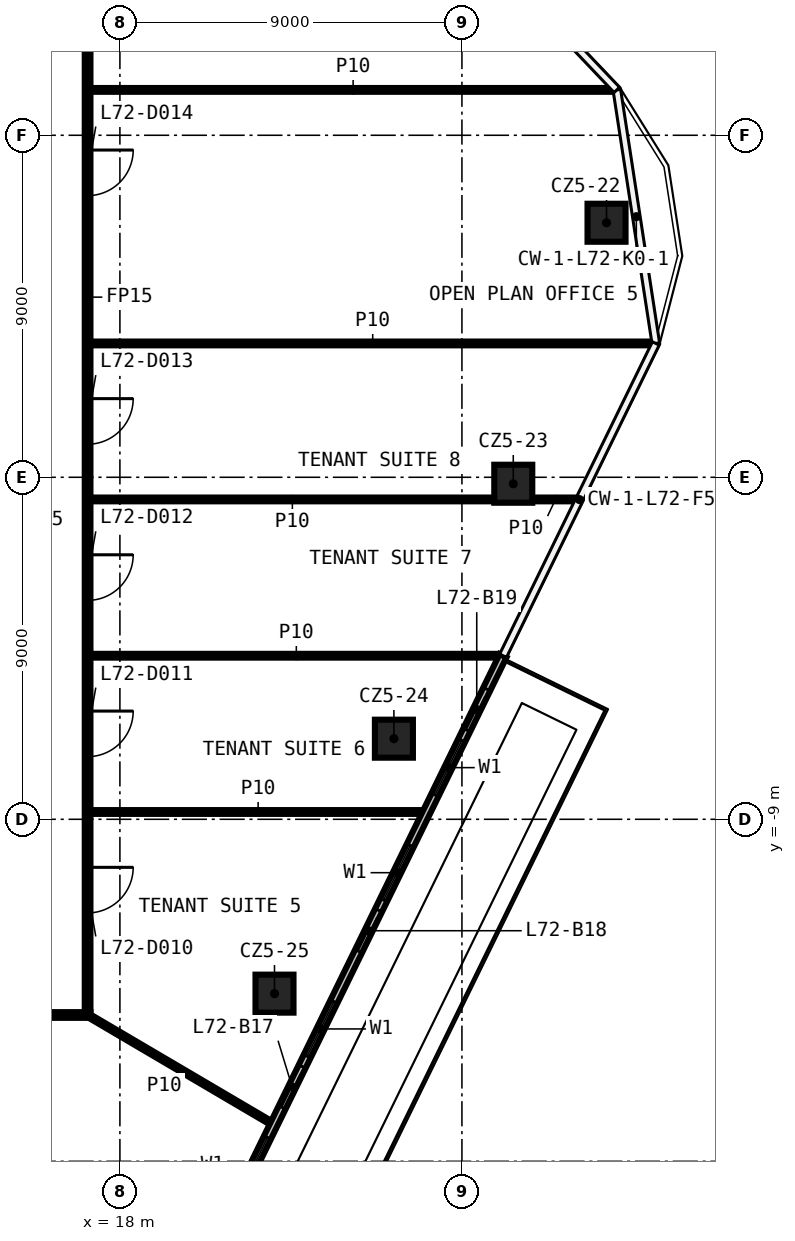
"""IFC4 building model, lengths in metres.
Left out: names, types, materials, properties, quantities, classifications, styles, units other than length and angle.
Written with IfcOpenShell. Run it as: python <this file> out.ifc"""

import sys

from ifc_helpers import new_model, si_unit, direction, frame, frame_2d, origin, origin_2d, place, context, subcontext, project, spatial, rectangle, extrude, element, fill, save


model = new_model("IFC4")
c1 = context("Model", 3, precision=1e-05, world=origin(), true_north=direction((0.0, 1.0)))
c2 = subcontext(c1, "Body", "Model", "MODEL_VIEW")
j1 = project(units=[si_unit("LENGTHUNIT", "METRE"), si_unit("PLANEANGLEUNIT", "RADIAN")], contexts=[c1])
p1 = place(None, origin())
s1 = spatial("IfcSite", under=j1, at=p1, CompositionType="ELEMENT")
p2 = place(p1, origin())
s2 = spatial("IfcBuilding", under=s1, at=p2, CompositionType="ELEMENT")
p3 = place(p2, frame((0.0, 0.0, 336.2)))
s3 = spatial("IfcBuildingStorey", under=s2, at=p3, CompositionType="ELEMENT", Elevation=336.2)
for number, where, z_axis, x_axis in (
    (1, (30.805, 6.698, 0.0), (0.0, 0.0, 1.0), (1.0, 0.0, 0.0)),
    (2, (28.351, -0.17, 0.0), (0.0, 0.0, 1.0), (1.0, 0.0, 0.0)),
    (3, (25.21, -6.879, 0.0), (0.0, 0.0, 1.0), (1.0, 0.0, 0.0)),
    (4, (22.068, -13.588, 0.0), (0.0, 0.0, 1.0), (1.0, 0.0, 0.0)),
):
    element("IfcColumn", number, at=place(p3, frame(where, z_axis=z_axis, x_axis=x_axis)), inside=s3, PredefinedType="COLUMN", context=c2, shape_type="SweptSolid", body=[
        extrude(rectangle(XDim=1.0, YDim=1.0, at=origin_2d()), origin(), (0.0, 0.0, 1.0), 3.82),
    ])
p4 = place(p3, frame((17.225, -14.15, 0.0), z_axis=(0.0, 0.0, 1.0), x_axis=(-1.0, 0.0, 0.0)))
e5 = element("IfcWall", 5, at=p4, inside=s3, PredefinedType="PARTITIONING", context=c2, shape_type="SweptSolid", body=[
    extrude(rectangle(XDim=34.45, YDim=0.15, at=frame_2d((17.225, 0.0))), origin(), (0.0, 0.0, 1.0), 3.82),
])
p5 = place(p4, frame((24.639, 0.0, 0.0)))
e6 = element("IfcOpeningElement", 6, at=p5, cuts=e5, PredefinedType="OPENING", context=c2, shape_type="SweptSolid", body=[
    extrude(rectangle(XDim=1.2, YDim=2.1, at=frame_2d((0.6, 1.05))), frame((0.0, 0.085, 0.0), z_axis=(0.0, -1.0, 0.0), x_axis=(1.0, 0.0, 0.0)), (0.0, 0.0, 1.0), 0.17),
])
p6 = place(p4, frame((20.005, 0.0, 0.0)))
e7 = element("IfcOpeningElement", 7, at=p6, cuts=e5, PredefinedType="OPENING", context=c2, shape_type="SweptSolid", body=[
    extrude(rectangle(XDim=1.2, YDim=2.1, at=frame_2d((0.6, 1.05))), frame((0.0, 0.085, 0.0), z_axis=(0.0, -1.0, 0.0), x_axis=(1.0, 0.0, 0.0)), (0.0, 0.0, 1.0), 0.17),
])
p7 = place(p4, frame((15.367, 0.0, 0.0)))
e8 = element("IfcOpeningElement", 8, at=p7, cuts=e5, PredefinedType="OPENING", context=c2, shape_type="SweptSolid", body=[
    extrude(rectangle(XDim=1.2, YDim=2.1, at=frame_2d((0.6, 1.05))), frame((0.0, 0.085, 0.0), z_axis=(0.0, -1.0, 0.0), x_axis=(1.0, 0.0, 0.0)), (0.0, 0.0, 1.0), 0.17),
])
p8 = place(p4, frame((10.73, 0.0, 0.0)))
e9 = element("IfcOpeningElement", 9, at=p8, cuts=e5, PredefinedType="OPENING", context=c2, shape_type="SweptSolid", body=[
    extrude(rectangle(XDim=1.2, YDim=2.1, at=frame_2d((0.6, 1.05))), frame((0.0, 0.085, 0.0), z_axis=(0.0, -1.0, 0.0), x_axis=(1.0, 0.0, 0.0)), (0.0, 0.0, 1.0), 0.17),
])
p9 = place(p4, frame((6.097, 0.0, 0.0)))
e10 = element("IfcOpeningElement", 10, at=p9, cuts=e5, PredefinedType="OPENING", context=c2, shape_type="SweptSolid", body=[
    extrude(rectangle(XDim=1.2, YDim=2.1, at=frame_2d((0.6, 1.05))), frame((0.0, 0.085, 0.0), z_axis=(0.0, -1.0, 0.0), x_axis=(1.0, 0.0, 0.0)), (0.0, 0.0, 1.0), 0.17),
])
p10 = place(p4, frame((1.83, 0.0, 0.0)))
e11 = element("IfcOpeningElement", 11, at=p10, cuts=e5, PredefinedType="OPENING", context=c2, shape_type="SweptSolid", body=[
    extrude(rectangle(XDim=1.2, YDim=2.1, at=frame_2d((0.6, 1.05))), frame((0.0, 0.085, 0.0), z_axis=(0.0, -1.0, 0.0), x_axis=(1.0, 0.0, 0.0)), (0.0, 0.0, 1.0), 0.17),
])
p11 = place(p3, frame((17.225, -8.808, 0.0), z_axis=(0.0, 0.0, 1.0), x_axis=(1.0, 0.0, 0.0)))
e12 = element("IfcWall", 12, at=p11, inside=s3, PredefinedType="PARTITIONING", context=c2, shape_type="SweptSolid", body=[
    extrude(rectangle(XDim=8.824, YDim=0.1, at=frame_2d((4.412, 0.0))), origin(), (0.0, 0.0, 1.0), 3.82),
])
p12 = place(p3, frame((17.225, -4.696, 0.0), z_axis=(0.0, 0.0, 1.0), x_axis=(1.0, 0.0, 0.0)))
e13 = element("IfcWall", 13, at=p12, inside=s3, PredefinedType="PARTITIONING", context=c2, shape_type="SweptSolid", body=[
    extrude(rectangle(XDim=10.835, YDim=0.1, at=frame_2d((5.417, 0.0))), origin(), (0.0, 0.0, 1.0), 3.82),
])
p13 = place(p3, frame((17.225, -0.583, 0.0), z_axis=(0.0, 0.0, 1.0), x_axis=(1.0, 0.0, 0.0)))
e14 = element("IfcWall", 14, at=p13, inside=s3, PredefinedType="PARTITIONING", context=c2, shape_type="SweptSolid", body=[
    extrude(rectangle(XDim=10.626, YDim=0.1, at=frame_2d((5.313, 0.0))), origin(), (0.0, 0.0, 1.0), 3.82),
])
p14 = place(p3, frame((28.851, -0.583, 0.0), z_axis=(0.0, 0.0, 1.0), x_axis=(1.0, 0.0, 0.0)))
e15 = element("IfcWall", 15, at=p14, inside=s3, PredefinedType="PARTITIONING", context=c2, shape_type="SweptSolid", body=[
    extrude(rectangle(XDim=1.221, YDim=0.1, at=frame_2d((0.611, 0.0))), origin(), (0.0, 0.0, 1.0), 3.82),
])
p15 = place(p3, frame((17.225, 3.522, 0.0), z_axis=(0.0, 0.0, 1.0), x_axis=(1.0, 0.0, 0.0)))
e16 = element("IfcWall", 16, at=p15, inside=s3, PredefinedType="PARTITIONING", context=c2, shape_type="SweptSolid", body=[
    extrude(rectangle(XDim=14.854, YDim=0.1, at=frame_2d((7.427, 0.0))), origin(), (0.0, 0.0, 1.0), 3.82),
])
p16 = place(p3, frame((17.225, 10.194, 0.0), z_axis=(0.0, 0.0, 1.0), x_axis=(1.0, 0.0, 0.0)))
e17 = element("IfcWall", 17, at=p16, inside=s3, PredefinedType="PARTITIONING", context=c2, shape_type="SweptSolid", body=[
    extrude(rectangle(XDim=13.823, YDim=0.1, at=frame_2d((6.912, 0.0))), origin(), (0.0, 0.0, 1.0), 3.82),
])
p17 = place(p3, frame((17.15, 14.075, 0.0), z_axis=(0.0, 0.0, 1.0), x_axis=(0.0, -1.0, 0.0)))
e18 = element("IfcWall", 18, at=p17, inside=s3, PredefinedType="PARTITIONING", context=c2, shape_type="SweptSolid", body=[
    extrude(rectangle(XDim=28.15, YDim=0.15, at=frame_2d((14.075, 0.0))), origin(), (0.0, 0.0, 1.0), 3.82),
])
p18 = place(p17, frame((24.339, 0.0, 0.0)))
e19 = element("IfcOpeningElement", 19, at=p18, cuts=e18, PredefinedType="OPENING", context=c2, shape_type="SweptSolid", body=[
    extrude(rectangle(XDim=1.2, YDim=2.1, at=frame_2d((0.6, 1.05))), frame((0.0, 0.085, 0.0), z_axis=(0.0, -1.0, 0.0), x_axis=(1.0, 0.0, 0.0)), (0.0, 0.0, 1.0), 0.17),
])
p19 = place(p17, frame((20.227, 0.0, 0.0)))
e20 = element("IfcOpeningElement", 20, at=p19, cuts=e18, PredefinedType="OPENING", context=c2, shape_type="SweptSolid", body=[
    extrude(rectangle(XDim=1.2, YDim=2.1, at=frame_2d((0.6, 1.05))), frame((0.0, 0.085, 0.0), z_axis=(0.0, -1.0, 0.0), x_axis=(1.0, 0.0, 0.0)), (0.0, 0.0, 1.0), 0.17),
])
p20 = place(p17, frame((16.115, 0.0, 0.0)))
e21 = element("IfcOpeningElement", 21, at=p20, cuts=e18, PredefinedType="OPENING", context=c2, shape_type="SweptSolid", body=[
    extrude(rectangle(XDim=1.2, YDim=2.1, at=frame_2d((0.6, 1.05))), frame((0.0, 0.085, 0.0), z_axis=(0.0, -1.0, 0.0), x_axis=(1.0, 0.0, 0.0)), (0.0, 0.0, 1.0), 0.17),
])
p21 = place(p17, frame((12.006, 0.0, 0.0)))
e22 = element("IfcOpeningElement", 22, at=p21, cuts=e18, PredefinedType="OPENING", context=c2, shape_type="SweptSolid", body=[
    extrude(rectangle(XDim=1.2, YDim=2.1, at=frame_2d((0.6, 1.05))), frame((0.0, 0.085, 0.0), z_axis=(0.0, -1.0, 0.0), x_axis=(1.0, 0.0, 0.0)), (0.0, 0.0, 1.0), 0.17),
])
p22 = place(p17, frame((5.464, 0.0, 0.0)))
e23 = element("IfcOpeningElement", 23, at=p22, cuts=e18, PredefinedType="OPENING", context=c2, shape_type="SweptSolid", body=[
    extrude(rectangle(XDim=1.2, YDim=2.1, at=frame_2d((0.6, 1.05))), frame((0.0, 0.085, 0.0), z_axis=(0.0, -1.0, 0.0), x_axis=(1.0, 0.0, 0.0)), (0.0, 0.0, 1.0), 0.17),
])
p23 = place(p17, frame((1.569, 0.0, 0.0)))
e24 = element("IfcOpeningElement", 24, at=p23, cuts=e18, PredefinedType="OPENING", context=c2, shape_type="SweptSolid", body=[
    extrude(rectangle(XDim=1.2, YDim=2.1, at=frame_2d((0.6, 1.05))), frame((0.0, 0.085, 0.0), z_axis=(0.0, -1.0, 0.0), x_axis=(1.0, 0.0, 0.0)), (0.0, 0.0, 1.0), 0.17),
])
p24 = place(p3, frame((17.15, -14.15, 0.0), z_axis=(0.0, 0.0, 1.0), x_axis=(0.861895432603, -0.507086051137, 0.0)))
e25 = element("IfcWall", 25, at=p24, inside=s3, PredefinedType="PARTITIONING", context=c2, shape_type="SweptSolid", body=[
    extrude(rectangle(XDim=5.664, YDim=0.1, at=frame_2d((2.832, 0.0))), origin(), (0.0, 0.0, 1.0), 3.82),
])
p25 = place(p3, frame((18.027, -25.256, 0.0), z_axis=(0.0, 0.0, 1.0), x_axis=(0.439336781314, 0.898322432418, 0.0)))
e26 = element("IfcWall", 26, at=p25, inside=s3, PredefinedType="SOLIDWALL", context=c2, shape_type="SweptSolid", body=[
    extrude(rectangle(XDim=22.887, YDim=0.2, at=frame_2d((11.444, 0.0))), origin(), (0.0, 0.0, 1.0), 3.82),
])
p26 = place(p25, frame((2.0, 0.0, 0.6)))
e27 = element("IfcOpeningElement", 27, at=p26, cuts=e26, PredefinedType="OPENING", context=c2, shape_type="SweptSolid", body=[
    extrude(rectangle(XDim=1.6, YDim=2.4, at=frame_2d((0.8, 1.2))), frame((0.0, 0.11, 0.0), z_axis=(0.0, -1.0, 0.0), x_axis=(1.0, 0.0, 0.0)), (0.0, 0.0, 1.0), 0.22),
])
p27 = place(p25, frame((0.5, 0.0, 0.0)))
e28 = element("IfcOpeningElement", 28, at=p27, cuts=e26, PredefinedType="OPENING", context=c2, shape_type="SweptSolid", body=[
    extrude(rectangle(XDim=1.2, YDim=2.4, at=frame_2d((0.6, 1.2))), frame((0.0, 0.11, 0.0), z_axis=(0.0, -1.0, 0.0), x_axis=(1.0, 0.0, 0.0)), (0.0, 0.0, 1.0), 0.22),
])
p28 = place(p25, frame((7.177, 0.0, 0.6)))
e29 = element("IfcOpeningElement", 29, at=p28, cuts=e26, PredefinedType="OPENING", context=c2, shape_type="SweptSolid", body=[
    extrude(rectangle(XDim=1.6, YDim=2.4, at=frame_2d((0.8, 1.2))), frame((0.0, 0.11, 0.0), z_axis=(0.0, -1.0, 0.0), x_axis=(1.0, 0.0, 0.0)), (0.0, 0.0, 1.0), 0.22),
])
p29 = place(p25, frame((5.677, 0.0, 0.0)))
e30 = element("IfcOpeningElement", 30, at=p29, cuts=e26, PredefinedType="OPENING", context=c2, shape_type="SweptSolid", body=[
    extrude(rectangle(XDim=1.2, YDim=2.4, at=frame_2d((0.6, 1.2))), frame((0.0, 0.11, 0.0), z_axis=(0.0, -1.0, 0.0), x_axis=(1.0, 0.0, 0.0)), (0.0, 0.0, 1.0), 0.22),
])
p30 = place(p25, frame((11.155, 0.0, 0.6)))
e31 = element("IfcOpeningElement", 31, at=p30, cuts=e26, PredefinedType="OPENING", context=c2, shape_type="SweptSolid", body=[
    extrude(rectangle(XDim=1.6, YDim=2.4, at=frame_2d((0.8, 1.2))), frame((0.0, 0.11, 0.0), z_axis=(0.0, -1.0, 0.0), x_axis=(1.0, 0.0, 0.0)), (0.0, 0.0, 1.0), 0.22),
])
p31 = place(p25, frame((9.655, 0.0, 0.0)))
e32 = element("IfcOpeningElement", 32, at=p31, cuts=e26, PredefinedType="OPENING", context=c2, shape_type="SweptSolid", body=[
    extrude(rectangle(XDim=1.2, YDim=2.4, at=frame_2d((0.6, 1.2))), frame((0.0, 0.11, 0.0), z_axis=(0.0, -1.0, 0.0), x_axis=(1.0, 0.0, 0.0)), (0.0, 0.0, 1.0), 0.22),
])
p32 = place(p25, frame((15.732, 0.0, 0.6)))
e33 = element("IfcOpeningElement", 33, at=p32, cuts=e26, PredefinedType="OPENING", context=c2, shape_type="SweptSolid", body=[
    extrude(rectangle(XDim=1.6, YDim=2.4, at=frame_2d((0.8, 1.2))), frame((0.0, 0.11, 0.0), z_axis=(0.0, -1.0, 0.0), x_axis=(1.0, 0.0, 0.0)), (0.0, 0.0, 1.0), 0.22),
])
p33 = place(p25, frame((14.232, 0.0, 0.0)))
e34 = element("IfcOpeningElement", 34, at=p33, cuts=e26, PredefinedType="OPENING", context=c2, shape_type="SweptSolid", body=[
    extrude(rectangle(XDim=1.2, YDim=2.4, at=frame_2d((0.6, 1.2))), frame((0.0, 0.11, 0.0), z_axis=(0.0, -1.0, 0.0), x_axis=(1.0, 0.0, 0.0)), (0.0, 0.0, 1.0), 0.22),
])
p34 = place(p25, frame((18.81, 0.0, 0.6)))
e35 = element("IfcOpeningElement", 35, at=p34, cuts=e26, PredefinedType="OPENING", context=c2, shape_type="SweptSolid", body=[
    extrude(rectangle(XDim=1.6, YDim=2.4, at=frame_2d((0.8, 1.2))), frame((0.0, 0.11, 0.0), z_axis=(0.0, -1.0, 0.0), x_axis=(1.0, 0.0, 0.0)), (0.0, 0.0, 1.0), 0.22),
])
p35 = place(p25, frame((20.71, 0.0, 0.0)))
e36 = element("IfcOpeningElement", 36, at=p35, cuts=e26, PredefinedType="OPENING", context=c2, shape_type="SweptSolid", body=[
    extrude(rectangle(XDim=1.2, YDim=2.4, at=frame_2d((0.6, 1.2))), frame((0.0, 0.11, 0.0), z_axis=(0.0, -1.0, 0.0), x_axis=(1.0, 0.0, 0.0)), (0.0, 0.0, 1.0), 0.22),
])
p36 = place(p18, origin())
e37 = element("IfcDoor", 37, at=p36, inside=s3, OperationType="SINGLE_SWING_LEFT", PredefinedType="DOOR", context=c2, shape_type="SweptSolid", body=[
    extrude(rectangle(XDim=1.2, YDim=2.1, at=frame_2d((0.6, 1.05))), frame((0.0, 0.025, 0.0), z_axis=(0.0, -1.0, 0.0), x_axis=(1.0, 0.0, 0.0)), (0.0, 0.0, 1.0), 0.05),
])
fill(e19, e37)
p37 = place(p19, origin())
e38 = element("IfcDoor", 38, at=p37, inside=s3, OperationType="SINGLE_SWING_RIGHT", PredefinedType="DOOR", context=c2, shape_type="SweptSolid", body=[
    extrude(rectangle(XDim=1.2, YDim=2.1, at=frame_2d((0.6, 1.05))), frame((0.0, 0.025, 0.0), z_axis=(0.0, -1.0, 0.0), x_axis=(1.0, 0.0, 0.0)), (0.0, 0.0, 1.0), 0.05),
])
fill(e20, e38)
p38 = place(p20, origin())
e39 = element("IfcDoor", 39, at=p38, inside=s3, OperationType="SINGLE_SWING_LEFT", PredefinedType="DOOR", context=c2, shape_type="SweptSolid", body=[
    extrude(rectangle(XDim=1.2, YDim=2.1, at=frame_2d((0.6, 1.05))), frame((0.0, 0.025, 0.0), z_axis=(0.0, -1.0, 0.0), x_axis=(1.0, 0.0, 0.0)), (0.0, 0.0, 1.0), 0.05),
])
fill(e21, e39)
p39 = place(p21, origin())
e40 = element("IfcDoor", 40, at=p39, inside=s3, OperationType="SINGLE_SWING_RIGHT", PredefinedType="DOOR", context=c2, shape_type="SweptSolid", body=[
    extrude(rectangle(XDim=1.2, YDim=2.1, at=frame_2d((0.6, 1.05))), frame((0.0, 0.025, 0.0), z_axis=(0.0, -1.0, 0.0), x_axis=(1.0, 0.0, 0.0)), (0.0, 0.0, 1.0), 0.05),
])
fill(e22, e40)
p40 = place(p22, origin())
e41 = element("IfcDoor", 41, at=p40, inside=s3, OperationType="SINGLE_SWING_LEFT", PredefinedType="DOOR", context=c2, shape_type="SweptSolid", body=[
    extrude(rectangle(XDim=1.2, YDim=2.1, at=frame_2d((0.6, 1.05))), frame((0.0, 0.025, 0.0), z_axis=(0.0, -1.0, 0.0), x_axis=(1.0, 0.0, 0.0)), (0.0, 0.0, 1.0), 0.05),
])
fill(e23, e41)
p41 = place(p28, origin())
e42 = element("IfcWindow", 42, at=p41, inside=s3, PartitioningType="SINGLE_PANEL", PredefinedType="WINDOW", context=c2, shape_type="SweptSolid", body=[
    extrude(rectangle(XDim=1.6, YDim=2.4, at=frame_2d((0.8, 1.2))), frame((0.0, 0.03, 0.0), z_axis=(0.0, -1.0, 0.0), x_axis=(1.0, 0.0, 0.0)), (0.0, 0.0, 1.0), 0.06),
])
fill(e29, e42)
p42 = place(p30, origin())
e43 = element("IfcWindow", 43, at=p42, inside=s3, PartitioningType="SINGLE_PANEL", PredefinedType="WINDOW", context=c2, shape_type="SweptSolid", body=[
    extrude(rectangle(XDim=1.6, YDim=2.4, at=frame_2d((0.8, 1.2))), frame((0.0, 0.03, 0.0), z_axis=(0.0, -1.0, 0.0), x_axis=(1.0, 0.0, 0.0)), (0.0, 0.0, 1.0), 0.06),
])
fill(e31, e43)
p43 = place(p31, origin())
e44 = element("IfcDoor", 44, at=p43, inside=s3, OperationType="SLIDING_TO_LEFT", PredefinedType="DOOR", context=c2, shape_type="SweptSolid", body=[
    extrude(rectangle(XDim=1.2, YDim=2.4, at=frame_2d((0.6, 1.2))), frame((0.0, 0.025, 0.0), z_axis=(0.0, -1.0, 0.0), x_axis=(1.0, 0.0, 0.0)), (0.0, 0.0, 1.0), 0.05),
])
fill(e32, e44)
p44 = place(p32, origin())
e45 = element("IfcWindow", 45, at=p44, inside=s3, PartitioningType="SINGLE_PANEL", PredefinedType="WINDOW", context=c2, shape_type="SweptSolid", body=[
    extrude(rectangle(XDim=1.6, YDim=2.4, at=frame_2d((0.8, 1.2))), frame((0.0, 0.03, 0.0), z_axis=(0.0, -1.0, 0.0), x_axis=(1.0, 0.0, 0.0)), (0.0, 0.0, 1.0), 0.06),
])
fill(e33, e45)
p45 = place(p33, origin())
e46 = element("IfcDoor", 46, at=p45, inside=s3, OperationType="SLIDING_TO_LEFT", PredefinedType="DOOR", context=c2, shape_type="SweptSolid", body=[
    extrude(rectangle(XDim=1.2, YDim=2.4, at=frame_2d((0.6, 1.2))), frame((0.0, 0.025, 0.0), z_axis=(0.0, -1.0, 0.0), x_axis=(1.0, 0.0, 0.0)), (0.0, 0.0, 1.0), 0.05),
])
fill(e34, e46)
p46 = place(p34, origin())
e47 = element("IfcWindow", 47, at=p46, inside=s3, PartitioningType="SINGLE_PANEL", PredefinedType="WINDOW", context=c2, shape_type="SweptSolid", body=[
    extrude(rectangle(XDim=1.6, YDim=2.4, at=frame_2d((0.8, 1.2))), frame((0.0, 0.03, 0.0), z_axis=(0.0, -1.0, 0.0), x_axis=(1.0, 0.0, 0.0)), (0.0, 0.0, 1.0), 0.06),
])
fill(e35, e47)
p47 = place(p35, origin())
e48 = element("IfcDoor", 48, at=p47, inside=s3, OperationType="SLIDING_TO_LEFT", PredefinedType="DOOR", context=c2, shape_type="SweptSolid", body=[
    extrude(rectangle(XDim=1.2, YDim=2.4, at=frame_2d((0.6, 1.2))), frame((0.0, 0.025, 0.0), z_axis=(0.0, -1.0, 0.0), x_axis=(1.0, 0.0, 0.0)), (0.0, 0.0, 1.0), 0.05),
])
fill(e36, e48)
save(model, sys.argv[1])
